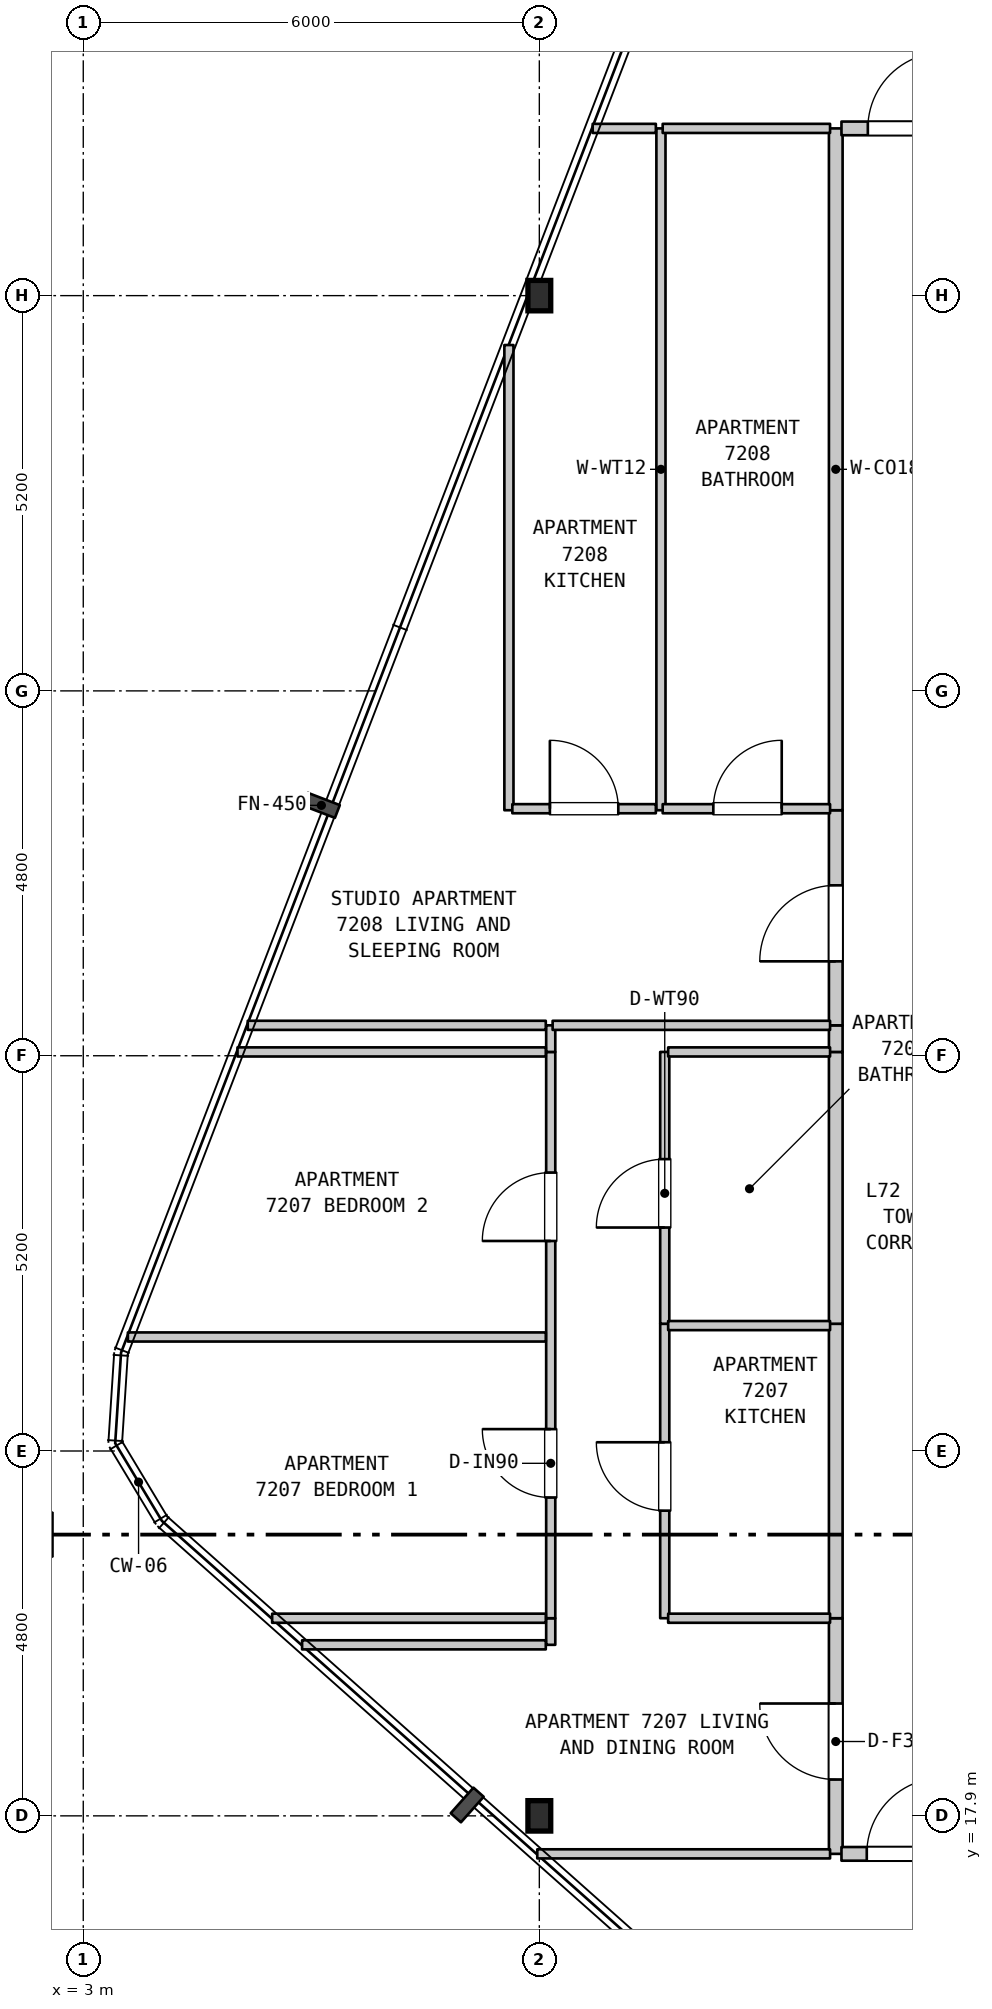
"""IFC4 building model, lengths in metres.
Left out: names, types, materials, properties, quantities, classifications, styles, units other than length and angle.
Written with IfcOpenShell. Run it as: python <this file> out.ifc"""

import sys

from ifc_helpers import new_model, si_unit, direction, frame, frame_2d, origin, origin_2d, place, context, subcontext, project, spatial, rectangle, i_section, extrude, element, fill, save


model = new_model("IFC4")
c1 = context("Model", 3, precision=1e-05, world=origin(), true_north=direction((0.0, 1.0)))
c2 = subcontext(c1, "Body", "Model", "MODEL_VIEW")
j1 = project(units=[si_unit("LENGTHUNIT", "METRE"), si_unit("PLANEANGLEUNIT", "RADIAN")], contexts=[c1])
p1 = place(None, origin())
s1 = spatial("IfcSite", under=j1, at=p1, CompositionType="ELEMENT")
p2 = place(p1, origin())
s2 = spatial("IfcBuilding", under=s1, at=p2, CompositionType="ELEMENT")
p3 = place(p2, frame((0.0, 0.0, 288.0)))
s3 = spatial("IfcBuildingStorey", under=s2, at=p3, CompositionType="ELEMENT", Elevation=288.0)
for number, where, z_axis, x_axis in (
    (1, (9.0, 17.9, 0.0), (0.0, 0.0, 1.0), (1.0, 0.0, 0.0)),
    (2, (9.0, 37.9, 0.0), (0.0, 0.0, 1.0), (1.0, 0.0, 0.0)),
):
    element("IfcColumn", number, at=place(p3, frame(where, z_axis=z_axis, x_axis=x_axis)), inside=s3, PredefinedType="COLUMN", context=c2, shape_type="SweptSolid", body=[
        extrude(i_section(OverallWidth=0.3, OverallDepth=0.4, WebThickness=0.013, FlangeThickness=0.024, FilletRadius=0.027, at=origin_2d()), origin(), (0.0, 0.0, 1.0), 3.7),
    ])
p4 = place(p3, frame((8.6, 31.13, 0.0), z_axis=(0.0, 0.0, 1.0), x_axis=(0.0, 1.0, 0.0)))
e3 = element("IfcWall", 3, at=p4, inside=s3, PredefinedType="PARTITIONING", context=c2, shape_type="SweptSolid", body=[
    extrude(rectangle(XDim=6.12, YDim=0.12, at=frame_2d((3.06, 0.0))), origin(), (0.0, 0.0, 1.0), 3.39),
])
p5 = place(p3, frame((9.15, 20.15, 0.0), z_axis=(0.0, 0.0, 1.0), x_axis=(0.0, 1.0, 0.0)))
e4 = element("IfcWall", 4, at=p5, inside=s3, PredefinedType="PARTITIONING", context=c2, shape_type="SweptSolid", body=[
    extrude(rectangle(XDim=0.35, YDim=0.12, at=frame_2d((0.175, 0.0))), origin(), (0.0, 0.0, 1.0), 3.39),
])
p6 = place(p3, frame((9.15, 20.5, 0.0), z_axis=(0.0, 0.0, 1.0), x_axis=(0.0, 1.0, 0.0)))
e5 = element("IfcWall", 5, at=p6, inside=s3, PredefinedType="PARTITIONING", context=c2, shape_type="SweptSolid", body=[
    extrude(rectangle(XDim=7.45, YDim=0.12, at=frame_2d((3.725, 0.0))), origin(), (0.0, 0.0, 1.0), 2.79),
])
p7 = place(p6, frame((1.588, 0.0, 0.0)))
e6 = element("IfcOpeningElement", 6, at=p7, cuts=e5, PredefinedType="OPENING", context=c2, shape_type="SweptSolid", body=[
    extrude(rectangle(XDim=0.9, YDim=2.15, at=frame_2d((0.45, 1.075))), frame((0.0, 0.07, 0.0), z_axis=(0.0, -1.0, 0.0), x_axis=(1.0, 0.0, 0.0)), (0.0, 0.0, 1.0), 0.14),
])
p8 = place(p6, frame((4.963, 0.0, 0.0)))
e7 = element("IfcOpeningElement", 7, at=p8, cuts=e5, PredefinedType="OPENING", context=c2, shape_type="SweptSolid", body=[
    extrude(rectangle(XDim=0.9, YDim=2.15, at=frame_2d((0.45, 1.075))), frame((0.0, 0.07, 0.0), z_axis=(0.0, -1.0, 0.0), x_axis=(1.0, 0.0, 0.0)), (0.0, 0.0, 1.0), 0.14),
])
p9 = place(p3, frame((9.15, 27.95, 0.0), z_axis=(0.0, 0.0, 1.0), x_axis=(0.0, 1.0, 0.0)))
e8 = element("IfcWall", 8, at=p9, inside=s3, PredefinedType="PARTITIONING", context=c2, shape_type="SweptSolid", body=[
    extrude(rectangle(XDim=0.35, YDim=0.12, at=frame_2d((0.175, 0.0))), origin(), (0.0, 0.0, 1.0), 3.39),
])
p10 = place(p3, frame((10.6, 31.13, 0.0), z_axis=(0.0, 0.0, 1.0), x_axis=(0.0, 1.0, 0.0)))
e9 = element("IfcWall", 9, at=p10, inside=s3, PredefinedType="PARTITIONING", context=c2, shape_type="SweptSolid", body=[
    extrude(rectangle(XDim=8.97, YDim=0.12, at=frame_2d((4.485, 0.0))), origin(), (0.0, 0.0, 1.0), 3.39),
])
p11 = place(p3, frame((10.65, 20.5, 0.0), z_axis=(0.0, 0.0, 1.0), x_axis=(0.0, 1.0, 0.0)))
e10 = element("IfcWall", 10, at=p11, inside=s3, PredefinedType="PARTITIONING", context=c2, shape_type="SweptSolid", body=[
    extrude(rectangle(XDim=3.874, YDim=0.12, at=frame_2d((1.937, 0.0))), origin(), (0.0, 0.0, 1.0), 3.39),
])
p12 = place(p11, frame((1.415, 0.0, 0.0)))
e11 = element("IfcOpeningElement", 11, at=p12, cuts=e10, PredefinedType="OPENING", context=c2, shape_type="SweptSolid", body=[
    extrude(rectangle(XDim=0.9, YDim=2.15, at=frame_2d((0.45, 1.075))), frame((0.0, 0.07, 0.0), z_axis=(0.0, -1.0, 0.0), x_axis=(1.0, 0.0, 0.0)), (0.0, 0.0, 1.0), 0.14),
])
p13 = place(p3, frame((10.65, 24.374, 0.0), z_axis=(0.0, 0.0, 1.0), x_axis=(0.0, 1.0, 0.0)))
e12 = element("IfcWall", 12, at=p13, inside=s3, PredefinedType="PARTITIONING", context=c2, shape_type="SweptSolid", body=[
    extrude(rectangle(XDim=3.576, YDim=0.12, at=frame_2d((1.788, 0.0))), origin(), (0.0, 0.0, 1.0), 3.39),
])
p14 = place(p13, frame((1.266, 0.0, 0.0)))
e13 = element("IfcOpeningElement", 13, at=p14, cuts=e12, PredefinedType="OPENING", context=c2, shape_type="SweptSolid", body=[
    extrude(rectangle(XDim=0.9, YDim=2.1, at=frame_2d((0.45, 1.05))), frame((0.0, 0.07, 0.0), z_axis=(0.0, -1.0, 0.0), x_axis=(1.0, 0.0, 0.0)), (0.0, 0.0, 1.0), 0.14),
])
p15 = place(p3, frame((12.9, 17.4, 0.0), z_axis=(0.0, 0.0, 1.0), x_axis=(0.0, 1.0, 0.0)))
e14 = element("IfcWall", 14, at=p15, inside=s3, PredefinedType="STANDARD", context=c2, shape_type="SweptSolid", body=[
    extrude(rectangle(XDim=3.1, YDim=0.18, at=frame_2d((1.55, 0.0))), origin(), (0.0, 0.0, 1.0), 3.39),
])
p16 = place(p15, frame((0.978, 0.0, 0.0)))
e15 = element("IfcOpeningElement", 15, at=p16, cuts=e14, PredefinedType="OPENING", context=c2, shape_type="SweptSolid", body=[
    extrude(rectangle(XDim=1.0, YDim=2.15, at=frame_2d((0.5, 1.075))), frame((0.0, 0.1, 0.0), z_axis=(0.0, -1.0, 0.0), x_axis=(1.0, 0.0, 0.0)), (0.0, 0.0, 1.0), 0.2),
])
p17 = place(p3, frame((12.9, 20.5, 0.0), z_axis=(0.0, 0.0, 1.0), x_axis=(0.0, 1.0, 0.0)))
e16 = element("IfcWall", 16, at=p17, inside=s3, PredefinedType="STANDARD", context=c2, shape_type="SweptSolid", body=[
    extrude(rectangle(XDim=3.874, YDim=0.18, at=frame_2d((1.937, 0.0))), origin(), (0.0, 0.0, 1.0), 3.39),
])
p18 = place(p3, frame((12.9, 24.374, 0.0), z_axis=(0.0, 0.0, 1.0), x_axis=(0.0, 1.0, 0.0)))
e17 = element("IfcWall", 17, at=p18, inside=s3, PredefinedType="STANDARD", context=c2, shape_type="SweptSolid", body=[
    extrude(rectangle(XDim=3.576, YDim=0.18, at=frame_2d((1.788, 0.0))), origin(), (0.0, 0.0, 1.0), 3.39),
])
p19 = place(p3, frame((12.9, 27.95, 0.0), z_axis=(0.0, 0.0, 1.0), x_axis=(0.0, 1.0, 0.0)))
e18 = element("IfcWall", 18, at=p19, inside=s3, PredefinedType="STANDARD", context=c2, shape_type="SweptSolid", body=[
    extrude(rectangle(XDim=0.35, YDim=0.18, at=frame_2d((0.175, 0.0))), origin(), (0.0, 0.0, 1.0), 3.39),
])
p20 = place(p3, frame((12.9, 28.3, 0.0), z_axis=(0.0, 0.0, 1.0), x_axis=(0.0, 1.0, 0.0)))
e19 = element("IfcWall", 19, at=p20, inside=s3, PredefinedType="STANDARD", context=c2, shape_type="SweptSolid", body=[
    extrude(rectangle(XDim=2.83, YDim=0.18, at=frame_2d((1.415, 0.0))), origin(), (0.0, 0.0, 1.0), 3.39),
])
p21 = place(p20, frame((0.842, 0.0, 0.0)))
e20 = element("IfcOpeningElement", 20, at=p21, cuts=e19, PredefinedType="OPENING", context=c2, shape_type="SweptSolid", body=[
    extrude(rectangle(XDim=1.0, YDim=2.15, at=frame_2d((0.5, 1.075))), frame((0.0, 0.1, 0.0), z_axis=(0.0, -1.0, 0.0), x_axis=(1.0, 0.0, 0.0)), (0.0, 0.0, 1.0), 0.2),
])
p22 = place(p3, frame((12.9, 31.13, 0.0), z_axis=(0.0, 0.0, 1.0), x_axis=(0.0, 1.0, 0.0)))
e21 = element("IfcWall", 21, at=p22, inside=s3, PredefinedType="STANDARD", context=c2, shape_type="SweptSolid", body=[
    extrude(rectangle(XDim=8.97, YDim=0.18, at=frame_2d((4.485, 0.0))), origin(), (0.0, 0.0, 1.0), 3.39),
])
p23 = place(p3, frame((8.973, 17.4, 0.0), z_axis=(0.0, 0.0, 1.0), x_axis=(1.0, 0.0, 0.0)))
e22 = element("IfcWall", 22, at=p23, inside=s3, PredefinedType="PARTITIONING", context=c2, shape_type="SweptSolid", body=[
    extrude(rectangle(XDim=3.852, YDim=0.12, at=frame_2d((1.926, 0.0))), origin(), (0.0, 0.0, 1.0), 3.39),
])
p24 = place(p3, frame((12.975, 17.4, 0.0), z_axis=(0.0, 0.0, 1.0), x_axis=(1.0, 0.0, 0.0)))
e23 = element("IfcWall", 23, at=p24, inside=s3, PredefinedType="STANDARD", context=c2, shape_type="SweptSolid", body=[
    extrude(rectangle(XDim=3.48, YDim=0.18, at=frame_2d((1.74, 0.0))), origin(), (0.0, 0.0, 1.0), 3.39),
])
p25 = place(p24, frame((0.333, 0.0, 0.0)))
e24 = element("IfcOpeningElement", 24, at=p25, cuts=e23, PredefinedType="OPENING", context=c2, shape_type="SweptSolid", body=[
    extrude(rectangle(XDim=1.0, YDim=2.15, at=frame_2d((0.5, 1.075))), frame((0.0, 0.1, 0.0), z_axis=(0.0, -1.0, 0.0), x_axis=(1.0, 0.0, 0.0)), (0.0, 0.0, 1.0), 0.2),
])
p26 = place(p3, frame((5.879, 20.15, 0.0), z_axis=(0.0, 0.0, 1.0), x_axis=(1.0, 0.0, 0.0)))
e25 = element("IfcWall", 25, at=p26, inside=s3, PredefinedType="PARTITIONING", context=c2, shape_type="SweptSolid", body=[
    extrude(rectangle(XDim=3.206, YDim=0.12, at=frame_2d((1.603, 0.0))), origin(), (0.0, 0.0, 1.0), 3.39),
])
p27 = place(p3, frame((5.485, 20.5, 0.0), z_axis=(0.0, 0.0, 1.0), x_axis=(1.0, 0.0, 0.0)))
e26 = element("IfcWall", 26, at=p27, inside=s3, PredefinedType="PARTITIONING", context=c2, shape_type="SweptSolid", body=[
    extrude(rectangle(XDim=3.6, YDim=0.12, at=frame_2d((1.8, 0.0))), origin(), (0.0, 0.0, 1.0), 3.39),
])
p28 = place(p3, frame((10.695, 20.5, 0.0), z_axis=(0.0, 0.0, 1.0), x_axis=(1.0, 0.0, 0.0)))
e27 = element("IfcWall", 27, at=p28, inside=s3, PredefinedType="PARTITIONING", context=c2, shape_type="SweptSolid", body=[
    extrude(rectangle(XDim=2.13, YDim=0.12, at=frame_2d((1.065, 0.0))), origin(), (0.0, 0.0, 1.0), 3.39),
])
p29 = place(p3, frame((3.587, 24.2, 0.0), z_axis=(0.0, 0.0, 1.0), x_axis=(1.0, 0.0, 0.0)))
e28 = element("IfcWall", 28, at=p29, inside=s3, PredefinedType="PARTITIONING", context=c2, shape_type="SweptSolid", body=[
    extrude(rectangle(XDim=5.498, YDim=0.12, at=frame_2d((2.749, 0.0))), origin(), (0.0, 0.0, 1.0), 3.39),
])
p30 = place(p3, frame((10.695, 24.35, 0.0), z_axis=(0.0, 0.0, 1.0), x_axis=(1.0, 0.0, 0.0)))
e29 = element("IfcWall", 29, at=p30, inside=s3, PredefinedType="PARTITIONING", context=c2, shape_type="SweptSolid", body=[
    extrude(rectangle(XDim=2.13, YDim=0.12, at=frame_2d((1.065, 0.0))), origin(), (0.0, 0.0, 1.0), 3.39),
])
p31 = place(p3, frame((5.029, 27.95, 0.0), z_axis=(0.0, 0.0, 1.0), x_axis=(1.0, 0.0, 0.0)))
e30 = element("IfcWall", 30, at=p31, inside=s3, PredefinedType="PARTITIONING", context=c2, shape_type="SweptSolid", body=[
    extrude(rectangle(XDim=4.056, YDim=0.12, at=frame_2d((2.028, 0.0))), origin(), (0.0, 0.0, 1.0), 3.39),
])
p32 = place(p3, frame((10.695, 27.95, 0.0), z_axis=(0.0, 0.0, 1.0), x_axis=(1.0, 0.0, 0.0)))
e31 = element("IfcWall", 31, at=p32, inside=s3, PredefinedType="PARTITIONING", context=c2, shape_type="SweptSolid", body=[
    extrude(rectangle(XDim=2.13, YDim=0.12, at=frame_2d((1.065, 0.0))), origin(), (0.0, 0.0, 1.0), 3.39),
])
p33 = place(p3, frame((5.164, 28.3, 0.0), z_axis=(0.0, 0.0, 1.0), x_axis=(1.0, 0.0, 0.0)))
e32 = element("IfcWall", 32, at=p33, inside=s3, PredefinedType="PARTITIONING", context=c2, shape_type="SweptSolid", body=[
    extrude(rectangle(XDim=3.921, YDim=0.12, at=frame_2d((1.96, 0.0))), origin(), (0.0, 0.0, 1.0), 3.39),
])
p34 = place(p3, frame((9.175, 28.3, 0.0), z_axis=(0.0, 0.0, 1.0), x_axis=(1.0, 0.0, 0.0)))
e33 = element("IfcWall", 33, at=p34, inside=s3, PredefinedType="PARTITIONING", context=c2, shape_type="SweptSolid", body=[
    extrude(rectangle(XDim=3.65, YDim=0.12, at=frame_2d((1.825, 0.0))), origin(), (0.0, 0.0, 1.0), 3.39),
])
p35 = place(p3, frame((8.645, 31.15, 0.0), z_axis=(0.0, 0.0, 1.0), x_axis=(1.0, 0.0, 0.0)))
e34 = element("IfcWall", 34, at=p35, inside=s3, PredefinedType="PARTITIONING", context=c2, shape_type="SweptSolid", body=[
    extrude(rectangle(XDim=1.888, YDim=0.12, at=frame_2d((0.944, 0.0))), origin(), (0.0, 0.0, 1.0), 3.39),
])
p36 = place(p35, frame((0.494, 0.0, 0.0)))
e35 = element("IfcOpeningElement", 35, at=p36, cuts=e34, PredefinedType="OPENING", context=c2, shape_type="SweptSolid", body=[
    extrude(rectangle(XDim=0.9, YDim=2.15, at=frame_2d((0.45, 1.075))), frame((0.0, 0.07, 0.0), z_axis=(0.0, -1.0, 0.0), x_axis=(1.0, 0.0, 0.0)), (0.0, 0.0, 1.0), 0.14),
])
p37 = place(p3, frame((10.623, 31.15, 0.0), z_axis=(0.0, 0.0, 1.0), x_axis=(1.0, 0.0, 0.0)))
e36 = element("IfcWall", 36, at=p37, inside=s3, PredefinedType="PARTITIONING", context=c2, shape_type="SweptSolid", body=[
    extrude(rectangle(XDim=2.202, YDim=0.12, at=frame_2d((1.101, 0.0))), origin(), (0.0, 0.0, 1.0), 3.39),
])
p38 = place(p37, frame((0.666, 0.0, 0.0)))
e37 = element("IfcOpeningElement", 37, at=p38, cuts=e36, PredefinedType="OPENING", context=c2, shape_type="SweptSolid", body=[
    extrude(rectangle(XDim=0.9, YDim=2.1, at=frame_2d((0.45, 1.05))), frame((0.0, 0.07, 0.0), z_axis=(0.0, -1.0, 0.0), x_axis=(1.0, 0.0, 0.0)), (0.0, 0.0, 1.0), 0.14),
])
p39 = place(p3, frame((9.702, 40.1, 0.0), z_axis=(0.0, 0.0, 1.0), x_axis=(1.0, 0.0, 0.0)))
e38 = element("IfcWall", 38, at=p39, inside=s3, PredefinedType="PARTITIONING", context=c2, shape_type="SweptSolid", body=[
    extrude(rectangle(XDim=0.831, YDim=0.12, at=frame_2d((0.416, 0.0))), origin(), (0.0, 0.0, 1.0), 3.39),
])
p40 = place(p3, frame((10.623, 40.1, 0.0), z_axis=(0.0, 0.0, 1.0), x_axis=(1.0, 0.0, 0.0)))
e39 = element("IfcWall", 39, at=p40, inside=s3, PredefinedType="PARTITIONING", context=c2, shape_type="SweptSolid", body=[
    extrude(rectangle(XDim=2.202, YDim=0.12, at=frame_2d((1.101, 0.0))), origin(), (0.0, 0.0, 1.0), 3.39),
])
p41 = place(p3, frame((12.975, 40.1, 0.0), z_axis=(0.0, 0.0, 1.0), x_axis=(1.0, 0.0, 0.0)))
e40 = element("IfcWall", 40, at=p41, inside=s3, PredefinedType="STANDARD", context=c2, shape_type="SweptSolid", body=[
    extrude(rectangle(XDim=1.88, YDim=0.18, at=frame_2d((0.94, 0.0))), origin(), (0.0, 0.0, 1.0), 3.39),
])
p42 = place(p41, frame((0.347, 0.0, 0.0)))
e41 = element("IfcOpeningElement", 41, at=p42, cuts=e40, PredefinedType="OPENING", context=c2, shape_type="SweptSolid", body=[
    extrude(rectangle(XDim=1.0, YDim=2.15, at=frame_2d((0.5, 1.075))), frame((0.0, 0.1, 0.0), z_axis=(0.0, -1.0, 0.0), x_axis=(1.0, 0.0, 0.0)), (0.0, 0.0, 1.0), 0.2),
])
p43 = place(p7, origin())
e42 = element("IfcDoor", 42, at=p43, inside=s3, OperationType="SINGLE_SWING_RIGHT", PredefinedType="DOOR", context=c2, shape_type="SweptSolid", body=[
    extrude(rectangle(XDim=0.9, YDim=2.15, at=frame_2d((0.45, 1.075))), frame((0.0, 0.025, 0.0), z_axis=(0.0, -1.0, 0.0), x_axis=(1.0, 0.0, 0.0)), (0.0, 0.0, 1.0), 0.05),
])
fill(e6, e42)
p44 = place(p8, origin())
e43 = element("IfcDoor", 43, at=p44, inside=s3, OperationType="SINGLE_SWING_LEFT", PredefinedType="DOOR", context=c2, shape_type="SweptSolid", body=[
    extrude(rectangle(XDim=0.9, YDim=2.15, at=frame_2d((0.45, 1.075))), frame((0.0, 0.025, 0.0), z_axis=(0.0, -1.0, 0.0), x_axis=(1.0, 0.0, 0.0)), (0.0, 0.0, 1.0), 0.05),
])
fill(e7, e43)
p45 = place(p12, origin())
e44 = element("IfcDoor", 44, at=p45, inside=s3, OperationType="SINGLE_SWING_RIGHT", PredefinedType="DOOR", context=c2, shape_type="SweptSolid", body=[
    extrude(rectangle(XDim=0.9, YDim=2.15, at=frame_2d((0.45, 1.075))), frame((0.0, 0.025, 0.0), z_axis=(0.0, -1.0, 0.0), x_axis=(1.0, 0.0, 0.0)), (0.0, 0.0, 1.0), 0.05),
])
fill(e11, e44)
p46 = place(p14, origin())
e45 = element("IfcDoor", 45, at=p46, inside=s3, OperationType="SINGLE_SWING_LEFT", PredefinedType="DOOR", context=c2, shape_type="SweptSolid", body=[
    extrude(rectangle(XDim=0.9, YDim=2.1, at=frame_2d((0.45, 1.05))), frame((0.0, 0.025, 0.0), z_axis=(0.0, -1.0, 0.0), x_axis=(1.0, 0.0, 0.0)), (0.0, 0.0, 1.0), 0.05),
])
fill(e13, e45)
p47 = place(p16, origin())
e46 = element("IfcDoor", 46, at=p47, inside=s3, OperationType="SINGLE_SWING_RIGHT", PredefinedType="DOOR", context=c2, shape_type="SweptSolid", body=[
    extrude(rectangle(XDim=1.0, YDim=2.15, at=frame_2d((0.5, 1.075))), frame((0.0, 0.025, 0.0), z_axis=(0.0, -1.0, 0.0), x_axis=(1.0, 0.0, 0.0)), (0.0, 0.0, 1.0), 0.05),
])
fill(e15, e46)
p48 = place(p21, origin())
e47 = element("IfcDoor", 47, at=p48, inside=s3, OperationType="SINGLE_SWING_LEFT", PredefinedType="DOOR", context=c2, shape_type="SweptSolid", body=[
    extrude(rectangle(XDim=1.0, YDim=2.15, at=frame_2d((0.5, 1.075))), frame((0.0, 0.025, 0.0), z_axis=(0.0, -1.0, 0.0), x_axis=(1.0, 0.0, 0.0)), (0.0, 0.0, 1.0), 0.05),
])
fill(e20, e47)
p49 = place(p25, origin())
e48 = element("IfcDoor", 48, at=p49, inside=s3, OperationType="SINGLE_SWING_RIGHT", PredefinedType="DOOR", context=c2, shape_type="SweptSolid", body=[
    extrude(rectangle(XDim=1.0, YDim=2.15, at=frame_2d((0.5, 1.075))), frame((0.0, 0.025, 0.0), z_axis=(0.0, -1.0, 0.0), x_axis=(1.0, 0.0, 0.0)), (0.0, 0.0, 1.0), 0.05),
])
fill(e24, e48)
p50 = place(p36, origin())
e49 = element("IfcDoor", 49, at=p50, inside=s3, OperationType="SINGLE_SWING_LEFT", PredefinedType="DOOR", context=c2, shape_type="SweptSolid", body=[
    extrude(rectangle(XDim=0.9, YDim=2.15, at=frame_2d((0.45, 1.075))), frame((0.0, 0.025, 0.0), z_axis=(0.0, -1.0, 0.0), x_axis=(1.0, 0.0, 0.0)), (0.0, 0.0, 1.0), 0.05),
])
fill(e35, e49)
p51 = place(p38, origin())
e50 = element("IfcDoor", 50, at=p51, inside=s3, OperationType="SINGLE_SWING_RIGHT", PredefinedType="DOOR", context=c2, shape_type="SweptSolid", body=[
    extrude(rectangle(XDim=0.9, YDim=2.1, at=frame_2d((0.45, 1.05))), frame((0.0, 0.025, 0.0), z_axis=(0.0, -1.0, 0.0), x_axis=(1.0, 0.0, 0.0)), (0.0, 0.0, 1.0), 0.05),
])
fill(e37, e50)
p52 = place(p42, origin())
e51 = element("IfcDoor", 51, at=p52, inside=s3, OperationType="SINGLE_SWING_RIGHT", PredefinedType="DOOR", context=c2, shape_type="SweptSolid", body=[
    extrude(rectangle(XDim=1.0, YDim=2.15, at=frame_2d((0.5, 1.075))), frame((0.0, 0.025, 0.0), z_axis=(0.0, -1.0, 0.0), x_axis=(1.0, 0.0, 0.0)), (0.0, 0.0, 1.0), 0.05),
])
fill(e41, e51)
save(model, sys.argv[1])
